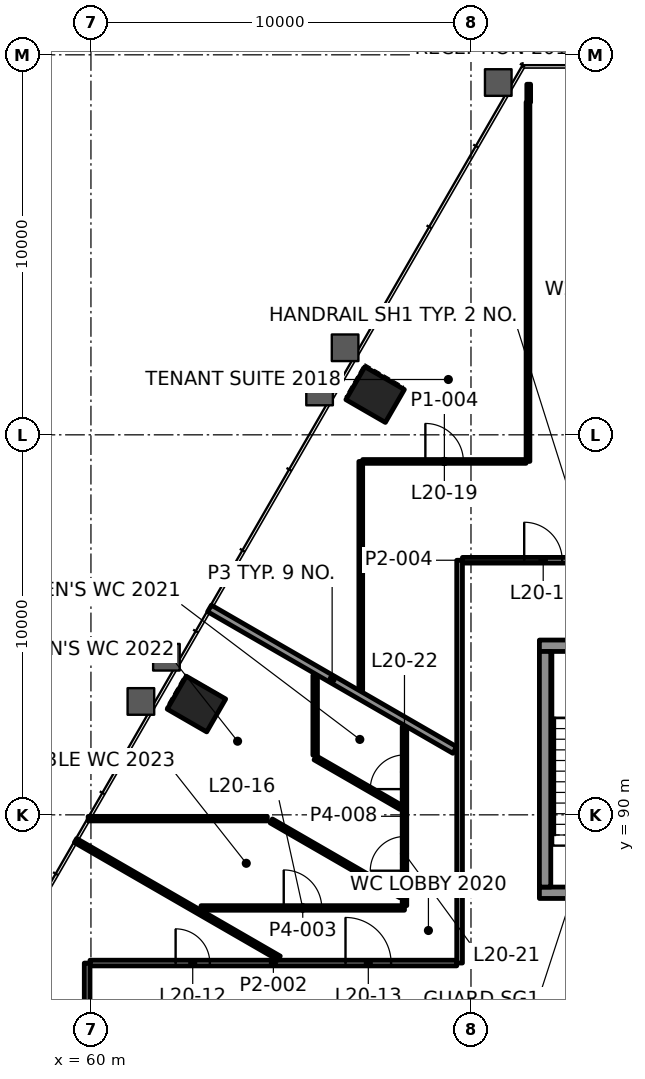
"""IFC4 building model, lengths in metres.
Left out: names, types, materials, properties, quantities, classifications, styles, units other than length and angle.
Written with IfcOpenShell. Run it as: python <this file> out.ifc"""

import sys

from ifc_helpers import new_model, si_unit, direction, frame, frame_2d, origin, origin_2d, place, context, subcontext, project, spatial, rectangle, extrude, element, fill, save


model = new_model("IFC4")
c1 = context("Model", 3, precision=1e-05, world=origin(), true_north=direction((0.0, 1.0)))
c2 = subcontext(c1, "Body", "Model", "MODEL_VIEW")
j1 = project(units=[si_unit("LENGTHUNIT", "METRE"), si_unit("PLANEANGLEUNIT", "RADIAN")], contexts=[c1])
p1 = place(None, origin())
s1 = spatial("IfcSite", under=j1, at=p1, CompositionType="ELEMENT")
p2 = place(p1, origin())
s2 = spatial("IfcBuilding", under=s1, at=p2, CompositionType="ELEMENT")
p3 = place(p2, frame((0.0, 0.0, 90.4)))
s3 = spatial("IfcBuildingStorey", under=s2, at=p3, CompositionType="ELEMENT", Elevation=90.4)
for number, where, z_axis, x_axis in (
    (1, (67.478, 101.059, -0.0), (0.0, 0.0, 1.0), (-0.5, -0.866, 0.0)),
    (2, (62.776, 92.916, -0.0), (0.0, 0.0, 1.0), (-0.5, -0.866, 0.0)),
):
    element("IfcColumn", number, at=place(p3, frame(where, z_axis=z_axis, x_axis=x_axis)), inside=s3, PredefinedType="COLUMN", context=c2, shape_type="SweptSolid", body=[
        extrude(rectangle(XDim=1.0, YDim=1.2, at=origin_2d()), origin(), (0.0, 0.0, 1.0), 4.2),
    ])
p4 = place(p3, frame((71.8, 87.95, 0.0), z_axis=(0.0, 0.0, 1.0), x_axis=(1.0, 0.0, 0.0)))
e3 = element("IfcWall", 3, at=p4, inside=s3, PredefinedType="SHEAR", context=c2, shape_type="SweptSolid", body=[
    extrude(rectangle(XDim=6.4, YDim=0.3, at=frame_2d((3.2, 0.0))), origin(), (0.0, 0.0, 1.0), 4.0),
])
p5 = place(p4, frame((1.325, 0.0, 0.0)))
e4 = element("IfcOpeningElement", 4, at=p5, cuts=e3, PredefinedType="OPENING", context=c2, shape_type="SweptSolid", body=[
    extrude(rectangle(XDim=1.0, YDim=2.1, at=frame_2d((0.5, 1.05))), frame((0.0, 0.16, 0.0), z_axis=(0.0, -1.0, 0.0), x_axis=(1.0, 0.0, 0.0)), (0.0, 0.0, 1.0), 0.32),
])
p6 = place(p4, frame((4.125, 0.0, 0.0)))
e5 = element("IfcOpeningElement", 5, at=p6, cuts=e3, PredefinedType="OPENING", context=c2, shape_type="SweptSolid", body=[
    extrude(rectangle(XDim=1.2, YDim=2.1, at=frame_2d((0.6, 1.05))), frame((0.0, 0.16, 0.0), z_axis=(0.0, -1.0, 0.0), x_axis=(1.0, 0.0, 0.0)), (0.0, 0.0, 1.0), 0.32),
])
p7 = place(p3, frame((71.8, 94.45, 0.0), z_axis=(0.0, 0.0, 1.0), x_axis=(1.0, 0.0, 0.0)))
e6 = element("IfcWall", 6, at=p7, inside=s3, PredefinedType="SHEAR", context=c2, shape_type="SweptSolid", body=[
    extrude(rectangle(XDim=6.4, YDim=0.3, at=frame_2d((3.2, 0.0))), origin(), (0.0, 0.0, 1.0), 4.0),
])
p8 = place(p3, frame((71.95, 88.1, 0.0), z_axis=(0.0, 0.0, 1.0), x_axis=(0.0, 1.0, 0.0)))
e7 = element("IfcWall", 7, at=p8, inside=s3, PredefinedType="SHEAR", context=c2, shape_type="SweptSolid", body=[
    extrude(rectangle(XDim=6.2, YDim=0.3, at=frame_2d((3.1, 0.0))), origin(), (0.0, 0.0, 1.0), 4.0),
])
p9 = place(p3, frame((59.976, 86.1, 0.0), z_axis=(0.0, 0.0, 1.0), x_axis=(1.0, 0.0, 0.0)))
e8 = element("IfcWall", 8, at=p9, inside=s3, PredefinedType="PARTITIONING", context=c2, shape_type="SweptSolid", body=[
    extrude(rectangle(XDim=9.649, YDim=0.15, at=frame_2d((4.825, 0.0))), origin(), (0.0, 0.0, 1.0), 3.4),
])
p10 = place(p9, frame((2.252, 0.0, 0.0)))
e9 = element("IfcOpeningElement", 9, at=p10, cuts=e8, PredefinedType="OPENING", context=c2, shape_type="SweptSolid", body=[
    extrude(rectangle(XDim=0.9, YDim=2.1, at=frame_2d((0.45, 1.05))), frame((0.0, 0.085, 0.0), z_axis=(0.0, -1.0, 0.0), x_axis=(1.0, 0.0, 0.0)), (0.0, 0.0, 1.0), 0.17),
])
p11 = place(p9, frame((6.723, 0.0, 0.0)))
e10 = element("IfcOpeningElement", 10, at=p11, cuts=e8, PredefinedType="OPENING", context=c2, shape_type="SweptSolid", body=[
    extrude(rectangle(XDim=1.2, YDim=2.1, at=frame_2d((0.6, 1.05))), frame((0.0, 0.085, 0.0), z_axis=(0.0, -1.0, 0.0), x_axis=(1.0, 0.0, 0.0)), (0.0, 0.0, 1.0), 0.17),
])
p12 = place(p3, frame((62.896, 87.55, 0.0), z_axis=(0.0, 0.0, 1.0), x_axis=(1.0, 0.0, 0.0)))
e11 = element("IfcWall", 11, at=p12, inside=s3, PredefinedType="PARTITIONING", context=c2, shape_type="SweptSolid", body=[
    extrude(rectangle(XDim=5.354, YDim=0.12, at=frame_2d((2.677, 0.0))), origin(), (0.0, 0.0, 1.0), 3.4),
])
p13 = place(p12, frame((2.177, 0.0, 0.0)))
e12 = element("IfcOpeningElement", 12, at=p13, cuts=e11, PredefinedType="OPENING", context=c2, shape_type="SweptSolid", body=[
    extrude(rectangle(XDim=1.0, YDim=2.1, at=frame_2d((0.5, 1.05))), frame((0.0, 0.07, 0.0), z_axis=(0.0, -1.0, 0.0), x_axis=(1.0, 0.0, 0.0)), (0.0, 0.0, 1.0), 0.14),
])
p14 = place(p3, frame((59.927, 89.9, 0.0), z_axis=(0.0, 0.0, 1.0), x_axis=(1.0, 0.0, 0.0)))
e13 = element("IfcWall", 13, at=p14, inside=s3, PredefinedType="PARTITIONING", context=c2, shape_type="SweptSolid", body=[
    extrude(rectangle(XDim=4.714, YDim=0.12, at=frame_2d((2.357, 0.0))), origin(), (0.0, 0.0, 1.0), 3.165),
])
p15 = place(p3, frame((69.775, 96.7, 0.0), z_axis=(0.0, 0.0, 1.0), x_axis=(1.0, 0.0, 0.0)))
e14 = element("IfcWall", 14, at=p15, inside=s3, PredefinedType="PARTITIONING", context=c2, shape_type="SweptSolid", body=[
    extrude(rectangle(XDim=4.25, YDim=0.15, at=frame_2d((2.125, 0.0))), origin(), (0.0, 0.0, 1.0), 3.4),
])
p16 = place(p15, frame((1.625, 0.0, 0.0)))
e15 = element("IfcOpeningElement", 15, at=p16, cuts=e14, PredefinedType="OPENING", context=c2, shape_type="SweptSolid", body=[
    extrude(rectangle(XDim=1.0, YDim=2.1, at=frame_2d((0.5, 1.05))), frame((0.0, 0.085, 0.0), z_axis=(0.0, -1.0, 0.0), x_axis=(1.0, 0.0, 0.0)), (0.0, 0.0, 1.0), 0.17),
])
p17 = place(p3, frame((67.15, 99.3, 0.0), z_axis=(0.0, 0.0, 1.0), x_axis=(1.0, 0.0, 0.0)))
e16 = element("IfcWall", 16, at=p17, inside=s3, PredefinedType="PARTITIONING", context=c2, shape_type="SweptSolid", body=[
    extrude(rectangle(XDim=4.3, YDim=0.1, at=frame_2d((2.15, 0.0))), origin(), (0.0, 0.0, 1.0), 3.4),
])
p18 = place(p17, frame((1.65, 0.0, 0.0)))
e17 = element("IfcOpeningElement", 17, at=p18, cuts=e16, PredefinedType="OPENING", context=c2, shape_type="SweptSolid", body=[
    extrude(rectangle(XDim=1.0, YDim=2.1, at=frame_2d((0.5, 1.05))), frame((0.0, 0.06, 0.0), z_axis=(0.0, -1.0, 0.0), x_axis=(1.0, 0.0, 0.0)), (0.0, 0.0, 1.0), 0.12),
])
p19 = place(p3, frame((71.519, 108.753, 0.0), z_axis=(0.0, 0.0, 1.0), x_axis=(0.0, 1.0, 0.0)))
e18 = element("IfcWall", 18, at=p19, inside=s3, PredefinedType="PARTITIONING", context=c2, shape_type="SweptSolid", body=[
    extrude(rectangle(XDim=0.473, YDim=0.1, at=frame_2d((0.236, 0.0))), origin(), (0.0, 0.0, 1.0), 3.4),
])
p20 = place(p3, frame((71.5, 99.301, 0.0), z_axis=(0.0, 0.0, 1.0), x_axis=(0.0, 1.0, 0.0)))
e19 = element("IfcWall", 19, at=p20, inside=s3, PredefinedType="PARTITIONING", context=c2, shape_type="SweptSolid", body=[
    extrude(rectangle(XDim=9.452, YDim=0.1, at=frame_2d((4.726, 0.0))), origin(), (0.0, 0.0, 1.0), 3.4),
])
p21 = place(p3, frame((69.7, 86.1, 0.0), z_axis=(0.0, 0.0, 1.0), x_axis=(0.0, 1.0, 0.0)))
e20 = element("IfcWall", 20, at=p21, inside=s3, PredefinedType="PARTITIONING", context=c2, shape_type="SweptSolid", body=[
    extrude(rectangle(XDim=10.599, YDim=0.15, at=frame_2d((5.3, 0.0))), origin(), (0.0, 0.0, 1.0), 3.322),
])
p22 = place(p3, frame((68.25, 87.61, 0.0), z_axis=(0.0, 0.0, 1.0), x_axis=(0.0, 1.0, 0.0)))
e21 = element("IfcWall", 21, at=p22, inside=s3, PredefinedType="PARTITIONING", context=c2, shape_type="SweptSolid", body=[
    extrude(rectangle(XDim=4.704, YDim=0.12, at=frame_2d((2.352, 0.0))), origin(), (0.0, 0.0, 1.0), 3.322),
])
p23 = place(p22, frame((0.92, 0.0, 0.0)))
e22 = element("IfcOpeningElement", 22, at=p23, cuts=e21, PredefinedType="OPENING", context=c2, shape_type="SweptSolid", body=[
    extrude(rectangle(XDim=0.9, YDim=2.1, at=frame_2d((0.45, 1.05))), frame((0.0, 0.07, 0.0), z_axis=(0.0, -1.0, 0.0), x_axis=(1.0, 0.0, 0.0)), (0.0, 0.0, 1.0), 0.14),
])
p24 = place(p22, frame((3.067, 0.0, 0.0)))
e23 = element("IfcOpeningElement", 23, at=p24, cuts=e21, PredefinedType="OPENING", context=c2, shape_type="SweptSolid", body=[
    extrude(rectangle(XDim=0.9, YDim=2.1, at=frame_2d((0.45, 1.05))), frame((0.0, 0.07, 0.0), z_axis=(0.0, -1.0, 0.0), x_axis=(1.0, 0.0, 0.0)), (0.0, 0.0, 1.0), 0.14),
])
p25 = place(p3, frame((67.1, 93.279, 0.0), z_axis=(0.0, 0.0, 1.0), x_axis=(0.0, 1.0, 0.0)))
e24 = element("IfcWall", 24, at=p25, inside=s3, PredefinedType="PARTITIONING", context=c2, shape_type="SweptSolid", body=[
    extrude(rectangle(XDim=6.021, YDim=0.1, at=frame_2d((3.01, 0.0))), origin(), (0.0, 0.0, 1.0), 3.4),
])
p26 = place(p3, frame((65.9, 91.569, 0.0), z_axis=(0.0, 0.0, 1.0), x_axis=(0.0, 1.0, 0.0)))
e25 = element("IfcWall", 25, at=p26, inside=s3, PredefinedType="PARTITIONING", context=c2, shape_type="SweptSolid", body=[
    extrude(rectangle(XDim=2.101, YDim=0.12, at=frame_2d((1.051, 0.0))), origin(), (0.0, 0.0, 1.0), 3.4),
])
p27 = place(p3, frame((59.9, 67.321, 0.0), z_axis=(0.0, 0.0, 1.0), x_axis=(0.0, 1.0, 0.0)))
e26 = element("IfcWall", 26, at=p27, inside=s3, PredefinedType="PARTITIONING", context=c2, shape_type="SweptSolid", body=[
    extrude(rectangle(XDim=18.778, YDim=0.15, at=frame_2d((9.389, 0.0))), origin(), (0.0, 0.0, 1.0), 3.4),
])
p28 = place(p3, frame((69.573, 91.706, 0.0), z_axis=(0.0, 0.0, 1.0), x_axis=(-0.866024622953, 0.500001352437, 0.0)))
e27 = element("IfcWall", 27, at=p28, inside=s3, PredefinedType="PARTITIONING", context=c2, shape_type="SweptSolid", body=[
    extrude(rectangle(XDim=7.451, YDim=0.2, at=frame_2d((3.726, 0.0))), origin(), (0.0, 0.0, 1.0), 3.165),
])
p29 = place(p3, frame((68.155, 90.198, 0.0), z_axis=(0.0, 0.0, 1.0), x_axis=(-0.866024771944, 0.500001094379, 0.0)))
e28 = element("IfcWall", 28, at=p29, inside=s3, PredefinedType="PARTITIONING", context=c2, shape_type="SweptSolid", body=[
    extrude(rectangle(XDim=2.604, YDim=0.12, at=frame_2d((1.302, 0.0))), origin(), (0.0, 0.0, 1.0), 3.4),
])
p30 = place(p3, frame((68.155, 87.871, 0.0), z_axis=(0.0, 0.0, 1.0), x_axis=(-0.866041060244, 0.499972881236, 0.0)))
e29 = element("IfcWall", 29, at=p30, inside=s3, PredefinedType="PARTITIONING", context=c2, shape_type="SweptSolid", body=[
    extrude(rectangle(XDim=3.938, YDim=0.12, at=frame_2d((1.969, 0.0))), origin(), (0.0, 0.0, 1.0), 3.4),
])
p31 = place(p3, frame((64.953, 86.23, 0.0), z_axis=(0.0, 0.0, 1.0), x_axis=(-0.866029863972, 0.499992274648, 0.0)))
e30 = element("IfcWall", 30, at=p31, inside=s3, PredefinedType="PARTITIONING", context=c2, shape_type="SweptSolid", body=[
    extrude(rectangle(XDim=6.188, YDim=0.12, at=frame_2d((3.094, 0.0))), origin(), (0.0, 0.0, 1.0), 3.165),
])
p32 = place(p10, origin())
e31 = element("IfcDoor", 31, at=p32, inside=s3, OperationType="SINGLE_SWING_LEFT", PredefinedType="DOOR", context=c2, shape_type="SweptSolid", body=[
    extrude(rectangle(XDim=0.9, YDim=2.1, at=frame_2d((0.45, 1.05))), frame((0.0, 0.025, 0.0), z_axis=(0.0, -1.0, 0.0), x_axis=(1.0, 0.0, 0.0)), (0.0, 0.0, 1.0), 0.05),
])
fill(e9, e31)
p33 = place(p11, origin())
e32 = element("IfcDoor", 32, at=p33, inside=s3, OperationType="DOUBLE_DOOR_SINGLE_SWING", PredefinedType="DOOR", context=c2, shape_type="SweptSolid", body=[
    extrude(rectangle(XDim=1.2, YDim=2.1, at=frame_2d((0.6, 1.05))), frame((0.0, 0.025, 0.0), z_axis=(0.0, -1.0, 0.0), x_axis=(1.0, 0.0, 0.0)), (0.0, 0.0, 1.0), 0.05),
])
fill(e10, e32)
p34 = place(p13, origin())
e33 = element("IfcDoor", 33, at=p34, inside=s3, OperationType="SINGLE_SWING_RIGHT", PredefinedType="DOOR", context=c2, shape_type="SweptSolid", body=[
    extrude(rectangle(XDim=1.0, YDim=2.1, at=frame_2d((0.5, 1.05))), frame((0.0, 0.025, 0.0), z_axis=(0.0, -1.0, 0.0), x_axis=(1.0, 0.0, 0.0)), (0.0, 0.0, 1.0), 0.05),
])
fill(e12, e33)
p35 = place(p16, origin())
e34 = element("IfcDoor", 34, at=p35, inside=s3, OperationType="SINGLE_SWING_RIGHT", PredefinedType="DOOR", context=c2, shape_type="SweptSolid", body=[
    extrude(rectangle(XDim=1.0, YDim=2.1, at=frame_2d((0.5, 1.05))), frame((0.0, 0.025, 0.0), z_axis=(0.0, -1.0, 0.0), x_axis=(1.0, 0.0, 0.0)), (0.0, 0.0, 1.0), 0.05),
])
fill(e15, e34)
p36 = place(p18, origin())
e35 = element("IfcDoor", 35, at=p36, inside=s3, OperationType="SINGLE_SWING_LEFT", PredefinedType="DOOR", context=c2, shape_type="SweptSolid", body=[
    extrude(rectangle(XDim=1.0, YDim=2.1, at=frame_2d((0.5, 1.05))), frame((0.0, 0.025, 0.0), z_axis=(0.0, -1.0, 0.0), x_axis=(1.0, 0.0, 0.0)), (0.0, 0.0, 1.0), 0.05),
])
fill(e17, e35)
p37 = place(p23, origin())
e36 = element("IfcDoor", 36, at=p37, inside=s3, OperationType="SINGLE_SWING_LEFT", PredefinedType="DOOR", context=c2, shape_type="SweptSolid", body=[
    extrude(rectangle(XDim=0.9, YDim=2.1, at=frame_2d((0.45, 1.05))), frame((0.0, 0.025, 0.0), z_axis=(0.0, -1.0, 0.0), x_axis=(1.0, 0.0, 0.0)), (0.0, 0.0, 1.0), 0.05),
])
fill(e22, e36)
p38 = place(p24, origin())
e37 = element("IfcDoor", 37, at=p38, inside=s3, OperationType="SINGLE_SWING_RIGHT", PredefinedType="DOOR", context=c2, shape_type="SweptSolid", body=[
    extrude(rectangle(XDim=0.9, YDim=2.1, at=frame_2d((0.45, 1.05))), frame((0.0, 0.025, 0.0), z_axis=(0.0, -1.0, 0.0), x_axis=(1.0, 0.0, 0.0)), (0.0, 0.0, 1.0), 0.05),
])
fill(e23, e37)
save(model, sys.argv[1])
